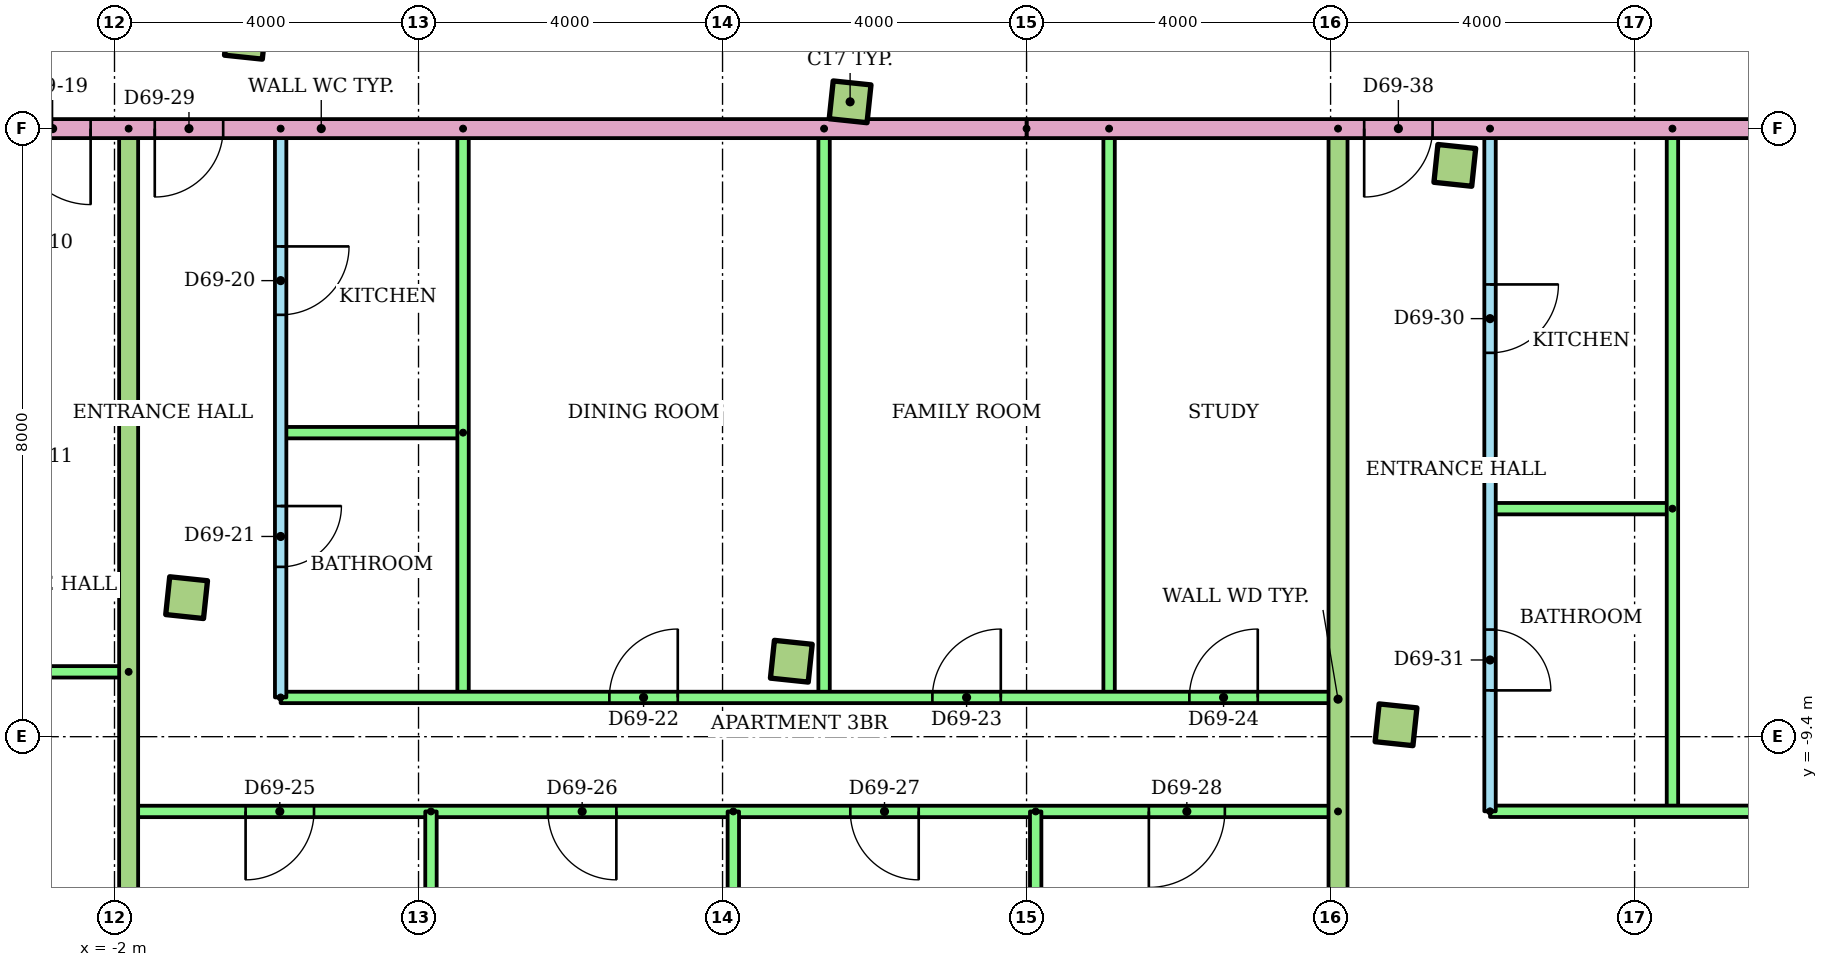
"""IFC4 building model, lengths in metres.
Left out: names, types, materials, properties, quantities, classifications, styles, units other than length and angle.
Written with IfcOpenShell. Run it as: python <this file> out.ifc"""

import sys

from ifc_helpers import new_model, si_unit, direction, frame, frame_2d, origin, origin_2d, place, context, subcontext, project, spatial, rectangle, extrude, element, fill, save


model = new_model("IFC4")
c1 = context("Model", 3, precision=1e-05, world=origin(), true_north=direction((0.0, 1.0)))
c2 = subcontext(c1, "Body", "Model", "MODEL_VIEW")
j1 = project(units=[si_unit("LENGTHUNIT", "METRE"), si_unit("PLANEANGLEUNIT", "RADIAN")], contexts=[c1])
p1 = place(None, origin())
s1 = spatial("IfcSite", under=j1, at=p1, CompositionType="ELEMENT")
p2 = place(p1, origin())
s2 = spatial("IfcBuilding", under=s1, at=p2, CompositionType="ELEMENT")
p3 = place(p2, frame((0.0, 0.0, 265.9)))
s3 = spatial("IfcBuildingStorey", under=s2, at=p3, CompositionType="ELEMENT", Elevation=265.9)
for number, where, z_axis, x_axis in (
    (1, (-1.051, -7.571, 0.0), (0.0, 0.0, 1.0), (0.995, -0.105, 0.0)),
    (2, (6.905, -8.407, 0.0), (0.0, 0.0, 1.0), (0.995, -0.105, 0.0)),
    (3, (14.861, -9.243, 0.0), (0.0, 0.0, 1.0), (0.995, -0.105, 0.0)),
    (4, (-0.278, -0.211, 0.0), (0.0, 0.0, 1.0), (0.995, -0.105, 0.0)),
    (5, (7.678, -1.048, 0.0), (0.0, 0.0, 1.0), (0.995, -0.105, 0.0)),
    (6, (15.635, -1.884, 0.0), (0.0, 0.0, 1.0), (0.995, -0.105, 0.0)),
):
    element("IfcColumn", number, at=place(p3, frame(where, z_axis=z_axis, x_axis=x_axis)), inside=s3, PredefinedType="COLUMN", context=c2, shape_type="SweptSolid", body=[
        extrude(rectangle(XDim=0.5, YDim=0.5, at=origin_2d()), origin(), (0.0, 0.0, 1.0), 3.2),
    ])
p4 = place(p3, frame((-1.814, -8.547, 0.0), z_axis=(0.0, 0.0, 1.0), x_axis=(-1.0, 0.0, 0.0)))
e7 = element("IfcWall", 7, at=p4, inside=s3, PredefinedType="PARTITIONING", context=c2, shape_type="SweptSolid", body=[
    extrude(rectangle(XDim=20.767, YDim=0.15, at=frame_2d((10.384, 0.0))), origin(), (0.0, 0.0, 1.0), 2.4),
])
p5 = place(p4, frame((16.604, 0.0, 0.0)))
e8 = element("IfcOpeningElement", 8, at=p5, cuts=e7, PredefinedType="OPENING", context=c2, shape_type="SweptSolid", body=[
    extrude(rectangle(XDim=0.9, YDim=2.1, at=frame_2d((0.45, 1.05))), frame((0.0, 0.085, 0.0), z_axis=(0.0, -1.0, 0.0), x_axis=(1.0, 0.0, 0.0)), (0.0, 0.0, 1.0), 0.17),
])
p6 = place(p4, frame((9.446, 0.0, 0.0)))
e9 = element("IfcOpeningElement", 9, at=p6, cuts=e7, PredefinedType="OPENING", context=c2, shape_type="SweptSolid", body=[
    extrude(rectangle(XDim=1.0, YDim=2.1, at=frame_2d((0.5, 1.05))), frame((0.0, 0.085, 0.0), z_axis=(0.0, -1.0, 0.0), x_axis=(1.0, 0.0, 0.0)), (0.0, 0.0, 1.0), 0.17),
])
p7 = place(p4, frame((5.517, 0.0, 0.0)))
e10 = element("IfcOpeningElement", 10, at=p7, cuts=e7, PredefinedType="OPENING", context=c2, shape_type="SweptSolid", body=[
    extrude(rectangle(XDim=0.9, YDim=2.1, at=frame_2d((0.45, 1.05))), frame((0.0, 0.085, 0.0), z_axis=(0.0, -1.0, 0.0), x_axis=(1.0, 0.0, 0.0)), (0.0, 0.0, 1.0), 0.17),
])
p8 = place(p4, frame((1.539, 0.0, 0.0)))
e11 = element("IfcOpeningElement", 11, at=p8, cuts=e7, PredefinedType="OPENING", context=c2, shape_type="SweptSolid", body=[
    extrude(rectangle(XDim=0.9, YDim=2.1, at=frame_2d((0.45, 1.05))), frame((0.0, 0.085, 0.0), z_axis=(0.0, -1.0, 0.0), x_axis=(1.0, 0.0, 0.0)), (0.0, 0.0, 1.0), 0.17),
])
p9 = place(p3, frame((0.186, -1.4, 0.0), z_axis=(0.0, 0.0, 1.0), x_axis=(0.0, -1.0, 0.0)))
e12 = element("IfcWall", 12, at=p9, inside=s3, PredefinedType="PARTITIONING", context=c2, shape_type="SweptSolid", body=[
    extrude(rectangle(XDim=7.484, YDim=0.15, at=frame_2d((3.742, 0.0))), origin(), (0.0, 0.0, 1.0), 2.4),
])
p10 = place(p9, frame((1.55, 0.0, 0.0)))
e13 = element("IfcOpeningElement", 13, at=p10, cuts=e12, PredefinedType="OPENING", context=c2, shape_type="SweptSolid", body=[
    extrude(rectangle(XDim=0.9, YDim=2.1, at=frame_2d((0.45, 1.05))), frame((0.0, 0.085, 0.0), z_axis=(0.0, -1.0, 0.0), x_axis=(1.0, 0.0, 0.0)), (0.0, 0.0, 1.0), 0.17),
])
p11 = place(p9, frame((4.966, 0.0, 0.0)))
e14 = element("IfcOpeningElement", 14, at=p11, cuts=e12, PredefinedType="OPENING", context=c2, shape_type="SweptSolid", body=[
    extrude(rectangle(XDim=0.8, YDim=2.1, at=frame_2d((0.4, 1.05))), frame((0.0, 0.085, 0.0), z_axis=(0.0, -1.0, 0.0), x_axis=(1.0, 0.0, 0.0)), (0.0, 0.0, 1.0), 0.17),
])
p12 = place(p3, frame((2.586, -5.4, 0.0), z_axis=(0.0, 0.0, 1.0), x_axis=(-1.0, 0.0, 0.0)))
e15 = element("IfcWall", 15, at=p12, inside=s3, PredefinedType="PARTITIONING", context=c2, shape_type="SweptSolid", body=[
    extrude(rectangle(XDim=2.4, YDim=0.15, at=frame_2d((1.2, 0.0))), origin(), (0.0, 0.0, 1.0), 2.4),
])
for number, where, z_axis, x_axis in (
    (16, (2.586, -1.4, 0.0), (0.0, 0.0, 1.0), (0.0, -1.0, 0.0)),
    (17, (7.336, -1.4, 0.0), (0.0, 0.0, 1.0), (0.0, -1.0, 0.0)),
    (18, (11.086, -1.4, 0.0), (0.0, 0.0, 1.0), (0.0, -1.0, 0.0)),
):
    element("IfcWall", number, at=place(p3, frame(where, z_axis=z_axis, x_axis=x_axis)), inside=s3, PredefinedType="PARTITIONING", context=c2, shape_type="SweptSolid", body=[
        extrude(rectangle(XDim=7.484, YDim=0.15, at=frame_2d((3.742, 0.0))), origin(), (0.0, 0.0, 1.0), 2.4),
    ])
p13 = place(p3, frame((0.186, -8.884, 0.0)))
e19 = element("IfcWall", 19, at=p13, inside=s3, PredefinedType="PARTITIONING", context=c2, shape_type="SweptSolid", body=[
    extrude(rectangle(XDim=13.912, YDim=0.15, at=frame_2d((6.956, 0.0))), origin(), (0.0, 0.0, 1.0), 2.4),
])
p14 = place(p13, frame((4.325, 0.0, 0.0)))
e20 = element("IfcOpeningElement", 20, at=p14, cuts=e19, PredefinedType="OPENING", context=c2, shape_type="SweptSolid", body=[
    extrude(rectangle(XDim=0.9, YDim=2.1, at=frame_2d((0.45, 1.05))), frame((0.0, 0.085, 0.0), z_axis=(0.0, -1.0, 0.0), x_axis=(1.0, 0.0, 0.0)), (0.0, 0.0, 1.0), 0.17),
])
p15 = place(p13, frame((8.575, 0.0, 0.0)))
e21 = element("IfcOpeningElement", 21, at=p15, cuts=e19, PredefinedType="OPENING", context=c2, shape_type="SweptSolid", body=[
    extrude(rectangle(XDim=0.9, YDim=2.1, at=frame_2d((0.45, 1.05))), frame((0.0, 0.085, 0.0), z_axis=(0.0, -1.0, 0.0), x_axis=(1.0, 0.0, 0.0)), (0.0, 0.0, 1.0), 0.17),
])
p16 = place(p13, frame((11.956, 0.0, 0.0)))
e22 = element("IfcOpeningElement", 22, at=p16, cuts=e19, PredefinedType="OPENING", context=c2, shape_type="SweptSolid", body=[
    extrude(rectangle(XDim=0.9, YDim=2.1, at=frame_2d((0.45, 1.05))), frame((0.0, 0.085, 0.0), z_axis=(0.0, -1.0, 0.0), x_axis=(1.0, 0.0, 0.0)), (0.0, 0.0, 1.0), 0.17),
])
p17 = place(p3, frame((14.098, -10.384, 0.0), z_axis=(0.0, 0.0, 1.0), x_axis=(-1.0, 0.0, 0.0)))
e23 = element("IfcWall", 23, at=p17, inside=s3, PredefinedType="PARTITIONING", context=c2, shape_type="SweptSolid", body=[
    extrude(rectangle(XDim=15.912, YDim=0.15, at=frame_2d((7.956, 0.0))), origin(), (0.0, 0.0, 1.0), 2.4),
])
p18 = place(p17, frame((13.473, 0.0, 0.0)))
e24 = element("IfcOpeningElement", 24, at=p18, cuts=e23, PredefinedType="OPENING", context=c2, shape_type="SweptSolid", body=[
    extrude(rectangle(XDim=0.9, YDim=2.1, at=frame_2d((0.45, 1.05))), frame((0.0, 0.085, 0.0), z_axis=(0.0, -1.0, 0.0), x_axis=(1.0, 0.0, 0.0)), (0.0, 0.0, 1.0), 0.17),
])
p19 = place(p17, frame((9.495, 0.0, 0.0)))
e25 = element("IfcOpeningElement", 25, at=p19, cuts=e23, PredefinedType="OPENING", context=c2, shape_type="SweptSolid", body=[
    extrude(rectangle(XDim=0.9, YDim=2.1, at=frame_2d((0.45, 1.05))), frame((0.0, 0.085, 0.0), z_axis=(0.0, -1.0, 0.0), x_axis=(1.0, 0.0, 0.0)), (0.0, 0.0, 1.0), 0.17),
])
p20 = place(p17, frame((5.517, 0.0, 0.0)))
e26 = element("IfcOpeningElement", 26, at=p20, cuts=e23, PredefinedType="OPENING", context=c2, shape_type="SweptSolid", body=[
    extrude(rectangle(XDim=0.9, YDim=2.1, at=frame_2d((0.45, 1.05))), frame((0.0, 0.085, 0.0), z_axis=(0.0, -1.0, 0.0), x_axis=(1.0, 0.0, 0.0)), (0.0, 0.0, 1.0), 0.17),
])
p21 = place(p17, frame((1.489, 0.0, 0.0)))
e27 = element("IfcOpeningElement", 27, at=p21, cuts=e23, PredefinedType="OPENING", context=c2, shape_type="SweptSolid", body=[
    extrude(rectangle(XDim=1.0, YDim=2.1, at=frame_2d((0.5, 1.05))), frame((0.0, 0.085, 0.0), z_axis=(0.0, -1.0, 0.0), x_axis=(1.0, 0.0, 0.0)), (0.0, 0.0, 1.0), 0.17),
])
p22 = place(p3, frame((2.164, -10.384, 0.0), z_axis=(0.0, 0.0, 1.0), x_axis=(0.0, -1.0, 0.0)))
e28 = element("IfcWall", 28, at=p22, inside=s3, PredefinedType="PARTITIONING", context=c2, shape_type="SweptSolid", body=[
    extrude(rectangle(XDim=4.786, YDim=0.15, at=frame_2d((2.393, 0.0))), origin(), (0.0, 0.0, 1.0), 2.4),
])
p23 = place(p3, frame((6.142, -10.384, 0.0), z_axis=(0.0, 0.0, 1.0), x_axis=(0.0, -1.0, 0.0)))
e29 = element("IfcWall", 29, at=p23, inside=s3, PredefinedType="PARTITIONING", context=c2, shape_type="SweptSolid", body=[
    extrude(rectangle(XDim=5.193, YDim=0.15, at=frame_2d((2.597, 0.0))), origin(), (0.0, 0.0, 1.0), 2.4),
])
p24 = place(p3, frame((10.12, -10.384, 0.0), z_axis=(0.0, 0.0, 1.0), x_axis=(0.0, -1.0, 0.0)))
e30 = element("IfcWall", 30, at=p24, inside=s3, PredefinedType="PARTITIONING", context=c2, shape_type="SweptSolid", body=[
    extrude(rectangle(XDim=5.622, YDim=0.15, at=frame_2d((2.811, 0.0))), origin(), (0.0, 0.0, 1.0), 2.4),
])
p25 = place(p3, frame((-1.814, -1.4, 0.0), z_axis=(0.0, 0.0, 1.0), x_axis=(0.0, -1.0, 0.0)))
e31 = element("IfcWall", 31, at=p25, inside=s3, PredefinedType="PARTITIONING", context=c2, shape_type="SweptSolid", body=[
    extrude(rectangle(XDim=13.341, YDim=0.25, at=frame_2d((6.67, 0.0))), origin(), (0.0, 0.0, 1.0), 2.4),
])
p26 = place(p3, frame((16.098, -1.4, 0.0), z_axis=(0.0, 0.0, 1.0), x_axis=(0.0, -1.0, 0.0)))
e32 = element("IfcWall", 32, at=p26, inside=s3, PredefinedType="PARTITIONING", context=c2, shape_type="SweptSolid", body=[
    extrude(rectangle(XDim=8.982, YDim=0.15, at=frame_2d((4.491, 0.0))), origin(), (0.0, 0.0, 1.0), 2.4),
])
p27 = place(p26, frame((2.05, 0.0, 0.0)))
e33 = element("IfcOpeningElement", 33, at=p27, cuts=e32, PredefinedType="OPENING", context=c2, shape_type="SweptSolid", body=[
    extrude(rectangle(XDim=0.9, YDim=2.1, at=frame_2d((0.45, 1.05))), frame((0.0, 0.085, 0.0), z_axis=(0.0, -1.0, 0.0), x_axis=(1.0, 0.0, 0.0)), (0.0, 0.0, 1.0), 0.17),
])
p28 = place(p26, frame((6.591, 0.0, 0.0)))
e34 = element("IfcOpeningElement", 34, at=p28, cuts=e32, PredefinedType="OPENING", context=c2, shape_type="SweptSolid", body=[
    extrude(rectangle(XDim=0.8, YDim=2.1, at=frame_2d((0.4, 1.05))), frame((0.0, 0.085, 0.0), z_axis=(0.0, -1.0, 0.0), x_axis=(1.0, 0.0, 0.0)), (0.0, 0.0, 1.0), 0.17),
])
p29 = place(p3, frame((18.498, -6.4, 0.0), z_axis=(0.0, 0.0, 1.0), x_axis=(-1.0, 0.0, 0.0)))
e35 = element("IfcWall", 35, at=p29, inside=s3, PredefinedType="PARTITIONING", context=c2, shape_type="SweptSolid", body=[
    extrude(rectangle(XDim=2.4, YDim=0.15, at=frame_2d((1.2, 0.0))), origin(), (0.0, 0.0, 1.0), 2.4),
])
p30 = place(p3, frame((18.498, -1.4, 0.0), z_axis=(0.0, 0.0, 1.0), x_axis=(0.0, -1.0, 0.0)))
e36 = element("IfcWall", 36, at=p30, inside=s3, PredefinedType="PARTITIONING", context=c2, shape_type="SweptSolid", body=[
    extrude(rectangle(XDim=8.982, YDim=0.15, at=frame_2d((4.491, 0.0))), origin(), (0.0, 0.0, 1.0), 2.4),
])
p31 = place(p3, frame((16.098, -10.382, 0.0)))
e37 = element("IfcWall", 37, at=p31, inside=s3, PredefinedType="PARTITIONING", context=c2, shape_type="SweptSolid", body=[
    extrude(rectangle(XDim=13.747, YDim=0.15, at=frame_2d((6.874, 0.0))), origin(), (0.0, 0.0, 1.0), 2.4),
])
p32 = place(p31, frame((4.825, 0.0, 0.0)))
e38 = element("IfcOpeningElement", 38, at=p32, cuts=e37, PredefinedType="OPENING", context=c2, shape_type="SweptSolid", body=[
    extrude(rectangle(XDim=0.9, YDim=2.1, at=frame_2d((0.45, 1.05))), frame((0.0, 0.085, 0.0), z_axis=(0.0, -1.0, 0.0), x_axis=(1.0, 0.0, 0.0)), (0.0, 0.0, 1.0), 0.17),
])
p33 = place(p31, frame((9.95, 0.0, 0.0)))
e39 = element("IfcOpeningElement", 39, at=p33, cuts=e37, PredefinedType="OPENING", context=c2, shape_type="SweptSolid", body=[
    extrude(rectangle(XDim=0.9, YDim=2.1, at=frame_2d((0.45, 1.05))), frame((0.0, 0.085, 0.0), z_axis=(0.0, -1.0, 0.0), x_axis=(1.0, 0.0, 0.0)), (0.0, 0.0, 1.0), 0.17),
])
p34 = place(p31, frame((12.747, 0.0, 0.0)))
e40 = element("IfcOpeningElement", 40, at=p34, cuts=e37, PredefinedType="OPENING", context=c2, shape_type="SweptSolid", body=[
    extrude(rectangle(XDim=0.9, YDim=2.1, at=frame_2d((0.45, 1.05))), frame((0.0, 0.085, 0.0), z_axis=(0.0, -1.0, 0.0), x_axis=(1.0, 0.0, 0.0)), (0.0, 0.0, 1.0), 0.17),
])
p35 = place(p3, frame((14.098, -1.4, 0.0), z_axis=(0.0, 0.0, 1.0), x_axis=(0.0, -1.0, 0.0)))
e41 = element("IfcWall", 41, at=p35, inside=s3, PredefinedType="PARTITIONING", context=c2, shape_type="SweptSolid", body=[
    extrude(rectangle(XDim=15.013, YDim=0.25, at=frame_2d((7.506, 0.0))), origin(), (0.0, 0.0, 1.0), 2.4),
])
p36 = place(p3, frame((25.0, -1.4, 0.0), z_axis=(0.0, 0.0, 1.0), x_axis=(-1.0, 0.0, 0.0)))
e42 = element("IfcWall", 42, at=p36, inside=s3, PredefinedType="PARTITIONING", context=c2, shape_type="SweptSolid", body=[
    extrude(rectangle(XDim=15.0, YDim=0.25, at=frame_2d((7.5, 0.0))), origin(), (0.0, 0.0, 1.0), 2.4),
])
p37 = place(p36, frame((9.658, 0.0, 0.0)))
e43 = element("IfcOpeningElement", 43, at=p37, cuts=e42, PredefinedType="OPENING", context=c2, shape_type="SweptSolid", body=[
    extrude(rectangle(XDim=0.9, YDim=2.1, at=frame_2d((0.45, 1.05))), frame((0.0, 0.135, 0.0), z_axis=(0.0, -1.0, 0.0), x_axis=(1.0, 0.0, 0.0)), (0.0, 0.0, 1.0), 0.27),
])
p38 = place(p3, frame((10.0, -1.4, 0.0), z_axis=(0.0, 0.0, 1.0), x_axis=(-1.0, 0.0, 0.0)))
e44 = element("IfcWall", 44, at=p38, inside=s3, PredefinedType="PARTITIONING", context=c2, shape_type="SweptSolid", body=[
    extrude(rectangle(XDim=20.0, YDim=0.25, at=frame_2d((10.0, 0.0))), origin(), (0.0, 0.0, 1.0), 2.4),
])
p39 = place(p38, frame((12.314, 0.0, 0.0)))
e45 = element("IfcOpeningElement", 45, at=p39, cuts=e44, PredefinedType="OPENING", context=c2, shape_type="SweptSolid", body=[
    extrude(rectangle(XDim=1.0, YDim=2.1, at=frame_2d((0.5, 1.05))), frame((0.0, 0.135, 0.0), z_axis=(0.0, -1.0, 0.0), x_axis=(1.0, 0.0, 0.0)), (0.0, 0.0, 1.0), 0.27),
])
p40 = place(p38, frame((10.57, 0.0, 0.0)))
e46 = element("IfcOpeningElement", 46, at=p40, cuts=e44, PredefinedType="OPENING", context=c2, shape_type="SweptSolid", body=[
    extrude(rectangle(XDim=0.9, YDim=2.1, at=frame_2d((0.45, 1.05))), frame((0.0, 0.135, 0.0), z_axis=(0.0, -1.0, 0.0), x_axis=(1.0, 0.0, 0.0)), (0.0, 0.0, 1.0), 0.27),
])
p41 = place(p39, origin())
e47 = element("IfcDoor", 47, at=p41, inside=s3, OperationType="SINGLE_SWING_LEFT", PredefinedType="DOOR", context=c2, shape_type="SweptSolid", body=[
    extrude(rectangle(XDim=1.0, YDim=2.1, at=frame_2d((0.5, 1.05))), frame((0.0, 0.025, 0.0), z_axis=(0.0, -1.0, 0.0), x_axis=(1.0, 0.0, 0.0)), (0.0, 0.0, 1.0), 0.05),
])
fill(e45, e47)
p42 = place(p10, origin())
e48 = element("IfcDoor", 48, at=p42, inside=s3, OperationType="SINGLE_SWING_LEFT", PredefinedType="DOOR", context=c2, shape_type="SweptSolid", body=[
    extrude(rectangle(XDim=0.9, YDim=2.1, at=frame_2d((0.45, 1.05))), frame((0.0, 0.025, 0.0), z_axis=(0.0, -1.0, 0.0), x_axis=(1.0, 0.0, 0.0)), (0.0, 0.0, 1.0), 0.05),
])
fill(e13, e48)
p43 = place(p11, origin())
e49 = element("IfcDoor", 49, at=p43, inside=s3, OperationType="SINGLE_SWING_LEFT", PredefinedType="DOOR", context=c2, shape_type="SweptSolid", body=[
    extrude(rectangle(XDim=0.8, YDim=2.1, at=frame_2d((0.4, 1.05))), frame((0.0, 0.025, 0.0), z_axis=(0.0, -1.0, 0.0), x_axis=(1.0, 0.0, 0.0)), (0.0, 0.0, 1.0), 0.05),
])
fill(e14, e49)
p44 = place(p14, origin())
e50 = element("IfcDoor", 50, at=p44, inside=s3, OperationType="SINGLE_SWING_RIGHT", PredefinedType="DOOR", context=c2, shape_type="SweptSolid", body=[
    extrude(rectangle(XDim=0.9, YDim=2.1, at=frame_2d((0.45, 1.05))), frame((0.0, 0.025, 0.0), z_axis=(0.0, -1.0, 0.0), x_axis=(1.0, 0.0, 0.0)), (0.0, 0.0, 1.0), 0.05),
])
fill(e20, e50)
p45 = place(p15, origin())
e51 = element("IfcDoor", 51, at=p45, inside=s3, OperationType="SINGLE_SWING_RIGHT", PredefinedType="DOOR", context=c2, shape_type="SweptSolid", body=[
    extrude(rectangle(XDim=0.9, YDim=2.1, at=frame_2d((0.45, 1.05))), frame((0.0, 0.025, 0.0), z_axis=(0.0, -1.0, 0.0), x_axis=(1.0, 0.0, 0.0)), (0.0, 0.0, 1.0), 0.05),
])
fill(e21, e51)
p46 = place(p16, origin())
e52 = element("IfcDoor", 52, at=p46, inside=s3, OperationType="SINGLE_SWING_RIGHT", PredefinedType="DOOR", context=c2, shape_type="SweptSolid", body=[
    extrude(rectangle(XDim=0.9, YDim=2.1, at=frame_2d((0.45, 1.05))), frame((0.0, 0.025, 0.0), z_axis=(0.0, -1.0, 0.0), x_axis=(1.0, 0.0, 0.0)), (0.0, 0.0, 1.0), 0.05),
])
fill(e22, e52)
p47 = place(p18, origin())
e53 = element("IfcDoor", 53, at=p47, inside=s3, OperationType="SINGLE_SWING_RIGHT", PredefinedType="DOOR", context=c2, shape_type="SweptSolid", body=[
    extrude(rectangle(XDim=0.9, YDim=2.1, at=frame_2d((0.45, 1.05))), frame((0.0, 0.025, 0.0), z_axis=(0.0, -1.0, 0.0), x_axis=(1.0, 0.0, 0.0)), (0.0, 0.0, 1.0), 0.05),
])
fill(e24, e53)
p48 = place(p19, origin())
e54 = element("IfcDoor", 54, at=p48, inside=s3, OperationType="SINGLE_SWING_LEFT", PredefinedType="DOOR", context=c2, shape_type="SweptSolid", body=[
    extrude(rectangle(XDim=0.9, YDim=2.1, at=frame_2d((0.45, 1.05))), frame((0.0, 0.025, 0.0), z_axis=(0.0, -1.0, 0.0), x_axis=(1.0, 0.0, 0.0)), (0.0, 0.0, 1.0), 0.05),
])
fill(e25, e54)
p49 = place(p20, origin())
e55 = element("IfcDoor", 55, at=p49, inside=s3, OperationType="SINGLE_SWING_LEFT", PredefinedType="DOOR", context=c2, shape_type="SweptSolid", body=[
    extrude(rectangle(XDim=0.9, YDim=2.1, at=frame_2d((0.45, 1.05))), frame((0.0, 0.025, 0.0), z_axis=(0.0, -1.0, 0.0), x_axis=(1.0, 0.0, 0.0)), (0.0, 0.0, 1.0), 0.05),
])
fill(e26, e55)
p50 = place(p21, origin())
e56 = element("IfcDoor", 56, at=p50, inside=s3, OperationType="SINGLE_SWING_RIGHT", PredefinedType="DOOR", context=c2, shape_type="SweptSolid", body=[
    extrude(rectangle(XDim=1.0, YDim=2.1, at=frame_2d((0.5, 1.05))), frame((0.0, 0.025, 0.0), z_axis=(0.0, -1.0, 0.0), x_axis=(1.0, 0.0, 0.0)), (0.0, 0.0, 1.0), 0.05),
])
fill(e27, e56)
p51 = place(p40, origin())
e57 = element("IfcDoor", 57, at=p51, inside=s3, OperationType="SINGLE_SWING_RIGHT", PredefinedType="DOOR", context=c2, shape_type="SweptSolid", body=[
    extrude(rectangle(XDim=0.9, YDim=2.1, at=frame_2d((0.45, 1.05))), frame((0.0, 0.025, 0.0), z_axis=(0.0, -1.0, 0.0), x_axis=(1.0, 0.0, 0.0)), (0.0, 0.0, 1.0), 0.05),
])
fill(e46, e57)
p52 = place(p27, origin())
e58 = element("IfcDoor", 58, at=p52, inside=s3, OperationType="SINGLE_SWING_LEFT", PredefinedType="DOOR", context=c2, shape_type="SweptSolid", body=[
    extrude(rectangle(XDim=0.9, YDim=2.1, at=frame_2d((0.45, 1.05))), frame((0.0, 0.025, 0.0), z_axis=(0.0, -1.0, 0.0), x_axis=(1.0, 0.0, 0.0)), (0.0, 0.0, 1.0), 0.05),
])
fill(e33, e58)
p53 = place(p28, origin())
e59 = element("IfcDoor", 59, at=p53, inside=s3, OperationType="SINGLE_SWING_RIGHT", PredefinedType="DOOR", context=c2, shape_type="SweptSolid", body=[
    extrude(rectangle(XDim=0.8, YDim=2.1, at=frame_2d((0.4, 1.05))), frame((0.0, 0.025, 0.0), z_axis=(0.0, -1.0, 0.0), x_axis=(1.0, 0.0, 0.0)), (0.0, 0.0, 1.0), 0.05),
])
fill(e34, e59)
p54 = place(p37, origin())
e60 = element("IfcDoor", 60, at=p54, inside=s3, OperationType="SINGLE_SWING_RIGHT", PredefinedType="DOOR", context=c2, shape_type="SweptSolid", body=[
    extrude(rectangle(XDim=0.9, YDim=2.1, at=frame_2d((0.45, 1.05))), frame((0.0, 0.025, 0.0), z_axis=(0.0, -1.0, 0.0), x_axis=(1.0, 0.0, 0.0)), (0.0, 0.0, 1.0), 0.05),
])
fill(e43, e60)
save(model, sys.argv[1])
